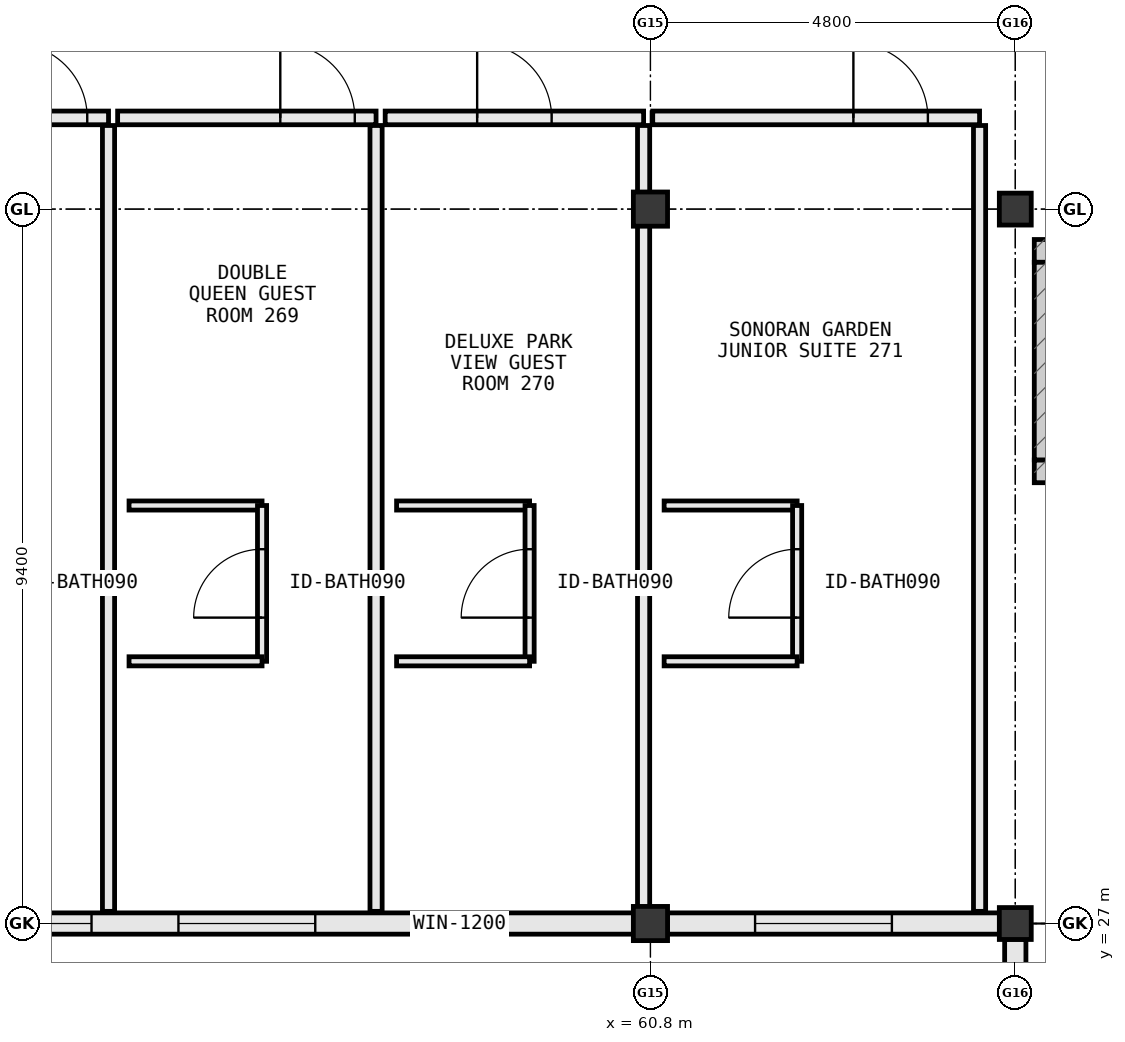
"""IFC4 building model, lengths in metres.
Left out: names, types, materials, properties, quantities, classifications, styles, units other than length and angle.
Written with IfcOpenShell. Run it as: python <this file> out.ifc"""

import sys

from ifc_helpers import new_model, si_unit, direction, frame, frame_2d, origin, origin_2d, place, context, subcontext, project, spatial, rectangle, extrude, element, fill, save


model = new_model("IFC4")
c1 = context("Model", 3, precision=1e-05, world=origin(), true_north=direction((0.0, 1.0)))
c2 = subcontext(c1, "Body", "Model", "MODEL_VIEW")
j1 = project(units=[si_unit("LENGTHUNIT", "METRE"), si_unit("PLANEANGLEUNIT", "RADIAN")], contexts=[c1])
p1 = place(None, origin())
s1 = spatial("IfcSite", under=j1, at=p1, CompositionType="ELEMENT")
p2 = place(p1, origin())
s2 = spatial("IfcBuilding", under=s1, at=p2, CompositionType="ELEMENT")
p3 = place(p2, frame((0.0, 0.0, 39.0)))
s3 = spatial("IfcBuildingStorey", under=s2, at=p3, CompositionType="ELEMENT", Elevation=39.0)
for number, where, z_axis, x_axis in (
    (1, (60.8, 27.0, 0.0), (0.0, 0.0, 1.0), (1.0, 0.0, 0.0)),
    (2, (60.8, 36.4, 0.0), (0.0, 0.0, 1.0), (1.0, 0.0, 0.0)),
):
    element("IfcColumn", number, at=place(p3, frame(where, z_axis=z_axis, x_axis=x_axis)), inside=s3, PredefinedType="COLUMN", context=c2, shape_type="SweptSolid", body=[
        extrude(rectangle(XDim=0.45, YDim=0.45, at=origin_2d()), origin(), (0.0, 0.0, 1.0), 3.8),
    ])
for number, where, z_axis, x_axis in (
    (3, (65.6, 27.0, 0.0), (0.0, 0.0, 1.0), (1.0, 0.0, 0.0)),
    (4, (65.6, 36.4, 0.0), (0.0, 0.0, 1.0), (1.0, 0.0, 0.0)),
):
    element("IfcColumn", number, at=place(p3, frame(where, z_axis=z_axis, x_axis=x_axis)), inside=s3, PredefinedType="COLUMN", context=c2, shape_type="SweptSolid", body=[
        extrude(rectangle(XDim=0.42, YDim=0.42, at=origin_2d()), origin(), (0.0, 0.0, 1.0), 3.8),
    ])
p4 = place(p3, frame((51.423, 27.0, 0.0), z_axis=(0.0, 0.0, 1.0), x_axis=(1.0, 0.0, 0.0)))
e5 = element("IfcWall", 5, at=p4, inside=s3, PredefinedType="STANDARD", context=c2, shape_type="SweptSolid", body=[
    extrude(rectangle(XDim=9.154, YDim=0.28, at=frame_2d((4.577, 0.0))), origin(), (0.0, 0.0, 1.0), 2.84),
])
p5 = place(p4, frame((6.265, 0.0, 0.85)))
e6 = element("IfcOpeningElement", 6, at=p5, cuts=e5, PredefinedType="OPENING", context=c2, shape_type="SweptSolid", body=[
    extrude(rectangle(XDim=1.2, YDim=1.55, at=frame_2d((0.6, 0.775))), frame((0.0, 0.152, 0.0), z_axis=(0.0, -1.0, 0.0), x_axis=(1.0, 0.0, 0.0)), (0.0, 0.0, 1.0), 0.304),
])
p6 = place(p4, frame((0.223, 0.0, 0.85)))
e7 = element("IfcOpeningElement", 7, at=p6, cuts=e5, PredefinedType="OPENING", context=c2, shape_type="SweptSolid", body=[
    extrude(rectangle(XDim=1.8, YDim=1.85, at=frame_2d((0.9, 0.925))), frame((0.0, 0.152, 0.0), z_axis=(0.0, -1.0, 0.0), x_axis=(1.0, 0.0, 0.0)), (0.0, 0.0, 1.0), 0.304),
])
p7 = place(p4, frame((3.167, 0.0, 0.85)))
e8 = element("IfcOpeningElement", 8, at=p7, cuts=e5, PredefinedType="OPENING", context=c2, shape_type="SweptSolid", body=[
    extrude(rectangle(XDim=1.8, YDim=1.85, at=frame_2d((0.9, 0.925))), frame((0.0, 0.152, 0.0), z_axis=(0.0, -1.0, 0.0), x_axis=(1.0, 0.0, 0.0)), (0.0, 0.0, 1.0), 0.304),
])
p8 = place(p3, frame((61.023, 27.0, 0.0), z_axis=(0.0, 0.0, 1.0), x_axis=(1.0, 0.0, 0.0)))
e9 = element("IfcWall", 9, at=p8, inside=s3, PredefinedType="STANDARD", context=c2, shape_type="SweptSolid", body=[
    extrude(rectangle(XDim=4.369, YDim=0.28, at=frame_2d((2.185, 0.0))), origin(), (0.0, 0.0, 1.0), 3.02),
])
p9 = place(p8, frame((1.154, 0.0, 0.85)))
e10 = element("IfcOpeningElement", 10, at=p9, cuts=e9, PredefinedType="OPENING", context=c2, shape_type="SweptSolid", body=[
    extrude(rectangle(XDim=1.8, YDim=1.85, at=frame_2d((0.9, 0.925))), frame((0.0, 0.152, 0.0), z_axis=(0.0, -1.0, 0.0), x_axis=(1.0, 0.0, 0.0)), (0.0, 0.0, 1.0), 0.304),
])
p10 = place(p3, frame((65.6, 26.792, 0.0), z_axis=(0.0, 0.0, 1.0), x_axis=(0.0, -1.0, 0.0)))
e11 = element("IfcWall", 11, at=p10, inside=s3, PredefinedType="STANDARD", context=c2, shape_type="SweptSolid", body=[
    extrude(rectangle(XDim=7.984, YDim=0.28, at=frame_2d((3.992, 0.0))), origin(), (0.0, 0.0, 1.0), 3.02),
])
p11 = place(p10, frame((3.242, 0.0, 0.85)))
e12 = element("IfcOpeningElement", 12, at=p11, cuts=e11, PredefinedType="OPENING", context=c2, shape_type="SweptSolid", body=[
    extrude(rectangle(XDim=1.5, YDim=1.75, at=frame_2d((0.75, 0.875))), frame((0.0, 0.152, 0.0), z_axis=(0.0, -1.0, 0.0), x_axis=(1.0, 0.0, 0.0)), (0.0, 0.0, 1.0), 0.304),
])
p12 = place(p3, frame((65.85, 32.95, 0.0), z_axis=(0.0, 0.0, 1.0), x_axis=(1.0, 0.0, 0.0)))
e13 = element("IfcWall", 13, at=p12, inside=s3, PredefinedType="SHEAR", context=c2, shape_type="SweptSolid", body=[
    extrude(rectangle(XDim=2.9, YDim=0.3, at=frame_2d((1.45, 0.0))), origin(), (0.0, 0.0, 1.0), 3.8),
])
p13 = place(p12, frame((0.85, 0.0, 0.0)))
e14 = element("IfcOpeningElement", 14, at=p13, cuts=e13, PredefinedType="OPENING", context=c2, shape_type="SweptSolid", body=[
    extrude(rectangle(XDim=1.2, YDim=2.2, at=frame_2d((0.6, 1.1))), frame((0.0, 0.162, 0.0), z_axis=(0.0, -1.0, 0.0), x_axis=(1.0, 0.0, 0.0)), (0.0, 0.0, 1.0), 0.324),
])
p14 = place(p3, frame((68.75, 35.85, 0.0), z_axis=(0.0, 0.0, 1.0), x_axis=(-1.0, 0.0, 0.0)))
e15 = element("IfcWall", 15, at=p14, inside=s3, PredefinedType="SHEAR", context=c2, shape_type="SweptSolid", body=[
    extrude(rectangle(XDim=2.9, YDim=0.3, at=frame_2d((1.45, 0.0))), origin(), (0.0, 0.0, 1.0), 3.8),
])
p15 = place(p3, frame((66.0, 35.7, 0.0), z_axis=(0.0, 0.0, 1.0), x_axis=(0.0, -1.0, 0.0)))
e16 = element("IfcWall", 16, at=p15, inside=s3, PredefinedType="SHEAR", context=c2, shape_type="SweptSolid", body=[
    extrude(rectangle(XDim=2.6, YDim=0.3, at=frame_2d((1.3, 0.0))), origin(), (0.0, 0.0, 1.0), 3.8),
])
p16 = place(p3, frame((53.67, 37.6, 0.0), z_axis=(0.0, 0.0, 1.0), x_axis=(-1.0, 0.0, 0.0)))
e17 = element("IfcWall", 17, at=p16, inside=s3, PredefinedType="PARTITIONING", context=c2, shape_type="SweptSolid", body=[
    extrude(rectangle(XDim=3.4, YDim=0.18, at=frame_2d((1.7, 0.0))), origin(), (0.0, 0.0, 1.0), 3.565),
])
p17 = place(p16, frame((0.28, 0.0, 0.0)))
e18 = element("IfcOpeningElement", 18, at=p17, cuts=e17, PredefinedType="OPENING", context=c2, shape_type="SweptSolid", body=[
    extrude(rectangle(XDim=0.98, YDim=2.18, at=frame_2d((0.49, 1.09))), frame((0.0, 0.102, 0.0), z_axis=(0.0, -1.0, 0.0), x_axis=(1.0, 0.0, 0.0)), (0.0, 0.0, 1.0), 0.204),
])
p18 = place(p3, frame((53.67, 27.16, 0.0), z_axis=(0.0, 0.0, 1.0), x_axis=(0.0, 1.0, 0.0)))
e19 = element("IfcWall", 19, at=p18, inside=s3, PredefinedType="PARTITIONING", context=c2, shape_type="SweptSolid", body=[
    extrude(rectangle(XDim=10.34, YDim=0.16, at=frame_2d((5.17, 0.0))), origin(), (0.0, 0.0, 1.0), 3.565),
])
p19 = place(p3, frame((57.19, 37.6, 0.0), z_axis=(0.0, 0.0, 1.0), x_axis=(-1.0, 0.0, 0.0)))
e20 = element("IfcWall", 20, at=p19, inside=s3, PredefinedType="PARTITIONING", context=c2, shape_type="SweptSolid", body=[
    extrude(rectangle(XDim=3.4, YDim=0.18, at=frame_2d((1.7, 0.0))), origin(), (0.0, 0.0, 1.0), 3.565),
])
p20 = place(p19, frame((0.28, 0.0, 0.0)))
e21 = element("IfcOpeningElement", 21, at=p20, cuts=e20, PredefinedType="OPENING", context=c2, shape_type="SweptSolid", body=[
    extrude(rectangle(XDim=0.98, YDim=2.18, at=frame_2d((0.49, 1.09))), frame((0.0, 0.102, 0.0), z_axis=(0.0, -1.0, 0.0), x_axis=(1.0, 0.0, 0.0)), (0.0, 0.0, 1.0), 0.204),
])
p21 = place(p3, frame((57.19, 27.16, 0.0), z_axis=(0.0, 0.0, 1.0), x_axis=(0.0, 1.0, 0.0)))
e22 = element("IfcWall", 22, at=p21, inside=s3, PredefinedType="PARTITIONING", context=c2, shape_type="SweptSolid", body=[
    extrude(rectangle(XDim=10.34, YDim=0.16, at=frame_2d((5.17, 0.0))), origin(), (0.0, 0.0, 1.0), 3.11),
])
p22 = place(p3, frame((53.94, 32.5, 0.0), z_axis=(0.0, 0.0, 1.0), x_axis=(1.0, 0.0, 0.0)))
e23 = element("IfcWall", 23, at=p22, inside=s3, PredefinedType="PARTITIONING", context=c2, shape_type="SweptSolid", body=[
    extrude(rectangle(XDim=1.75, YDim=0.12, at=frame_2d((0.875, 0.0))), origin(), (0.0, 0.0, 1.0), 3.565),
])
p23 = place(p3, frame((55.69, 30.45, 0.0), z_axis=(0.0, 0.0, 1.0), x_axis=(0.0, 1.0, 0.0)))
e24 = element("IfcWall", 24, at=p23, inside=s3, PredefinedType="PARTITIONING", context=c2, shape_type="SweptSolid", body=[
    extrude(rectangle(XDim=2.05, YDim=0.12, at=frame_2d((1.025, 0.0))), origin(), (0.0, 0.0, 1.0), 3.565),
])
p24 = place(p23, frame((0.575, 0.0, 0.0)))
e25 = element("IfcOpeningElement", 25, at=p24, cuts=e24, PredefinedType="OPENING", context=c2, shape_type="SweptSolid", body=[
    extrude(rectangle(XDim=0.9, YDim=2.15, at=frame_2d((0.45, 1.075))), frame((0.0, 0.072, 0.0), z_axis=(0.0, -1.0, 0.0), x_axis=(1.0, 0.0, 0.0)), (0.0, 0.0, 1.0), 0.144),
])
p25 = place(p3, frame((53.94, 30.45, 0.0), z_axis=(0.0, 0.0, 1.0), x_axis=(1.0, 0.0, 0.0)))
e26 = element("IfcWall", 26, at=p25, inside=s3, PredefinedType="PARTITIONING", context=c2, shape_type="SweptSolid", body=[
    extrude(rectangle(XDim=1.75, YDim=0.12, at=frame_2d((0.875, 0.0))), origin(), (0.0, 0.0, 1.0), 3.565),
])
p26 = place(p3, frame((60.71, 37.6, 0.0), z_axis=(0.0, 0.0, 1.0), x_axis=(-1.0, 0.0, 0.0)))
e27 = element("IfcWall", 27, at=p26, inside=s3, PredefinedType="PARTITIONING", context=c2, shape_type="SweptSolid", body=[
    extrude(rectangle(XDim=3.4, YDim=0.18, at=frame_2d((1.7, 0.0))), origin(), (0.0, 0.0, 1.0), 3.565),
])
p27 = place(p26, frame((1.21, 0.0, 0.0)))
e28 = element("IfcOpeningElement", 28, at=p27, cuts=e27, PredefinedType="OPENING", context=c2, shape_type="SweptSolid", body=[
    extrude(rectangle(XDim=0.98, YDim=2.18, at=frame_2d((0.49, 1.09))), frame((0.0, 0.102, 0.0), z_axis=(0.0, -1.0, 0.0), x_axis=(1.0, 0.0, 0.0)), (0.0, 0.0, 1.0), 0.204),
])
p28 = place(p3, frame((60.71, 27.16, 0.0), z_axis=(0.0, 0.0, 1.0), x_axis=(0.0, 1.0, 0.0)))
e29 = element("IfcWall", 29, at=p28, inside=s3, PredefinedType="PARTITIONING", context=c2, shape_type="SweptSolid", body=[
    extrude(rectangle(XDim=10.34, YDim=0.16, at=frame_2d((5.17, 0.0))), origin(), (0.0, 0.0, 1.0), 2.92),
])
p29 = place(p3, frame((57.46, 32.5, 0.0), z_axis=(0.0, 0.0, 1.0), x_axis=(1.0, 0.0, 0.0)))
e30 = element("IfcWall", 30, at=p29, inside=s3, PredefinedType="PARTITIONING", context=c2, shape_type="SweptSolid", body=[
    extrude(rectangle(XDim=1.75, YDim=0.12, at=frame_2d((0.875, 0.0))), origin(), (0.0, 0.0, 1.0), 3.565),
])
p30 = place(p3, frame((59.21, 30.45, 0.0), z_axis=(0.0, 0.0, 1.0), x_axis=(0.0, 1.0, 0.0)))
e31 = element("IfcWall", 31, at=p30, inside=s3, PredefinedType="PARTITIONING", context=c2, shape_type="SweptSolid", body=[
    extrude(rectangle(XDim=2.05, YDim=0.12, at=frame_2d((1.025, 0.0))), origin(), (0.0, 0.0, 1.0), 3.565),
])
p31 = place(p30, frame((0.575, 0.0, 0.0)))
e32 = element("IfcOpeningElement", 32, at=p31, cuts=e31, PredefinedType="OPENING", context=c2, shape_type="SweptSolid", body=[
    extrude(rectangle(XDim=0.9, YDim=2.15, at=frame_2d((0.45, 1.075))), frame((0.0, 0.072, 0.0), z_axis=(0.0, -1.0, 0.0), x_axis=(1.0, 0.0, 0.0)), (0.0, 0.0, 1.0), 0.144),
])
p32 = place(p3, frame((57.46, 30.45, 0.0), z_axis=(0.0, 0.0, 1.0), x_axis=(1.0, 0.0, 0.0)))
e33 = element("IfcWall", 33, at=p32, inside=s3, PredefinedType="PARTITIONING", context=c2, shape_type="SweptSolid", body=[
    extrude(rectangle(XDim=1.75, YDim=0.12, at=frame_2d((0.875, 0.0))), origin(), (0.0, 0.0, 1.0), 3.565),
])
p33 = place(p3, frame((65.13, 37.6, 0.0), z_axis=(0.0, 0.0, 1.0), x_axis=(-1.0, 0.0, 0.0)))
e34 = element("IfcWall", 34, at=p33, inside=s3, PredefinedType="PARTITIONING", context=c2, shape_type="SweptSolid", body=[
    extrude(rectangle(XDim=4.3, YDim=0.18, at=frame_2d((2.15, 0.0))), origin(), (0.0, 0.0, 1.0), 3.565),
])
p34 = place(p33, frame((0.68, 0.0, 0.0)))
e35 = element("IfcOpeningElement", 35, at=p34, cuts=e34, PredefinedType="OPENING", context=c2, shape_type="SweptSolid", body=[
    extrude(rectangle(XDim=0.98, YDim=2.18, at=frame_2d((0.49, 1.09))), frame((0.0, 0.102, 0.0), z_axis=(0.0, -1.0, 0.0), x_axis=(1.0, 0.0, 0.0)), (0.0, 0.0, 1.0), 0.204),
])
p35 = place(p3, frame((65.13, 27.16, 0.0), z_axis=(0.0, 0.0, 1.0), x_axis=(0.0, 1.0, 0.0)))
e36 = element("IfcWall", 36, at=p35, inside=s3, PredefinedType="PARTITIONING", context=c2, shape_type="SweptSolid", body=[
    extrude(rectangle(XDim=10.34, YDim=0.16, at=frame_2d((5.17, 0.0))), origin(), (0.0, 0.0, 1.0), 3.565),
])
p36 = place(p3, frame((60.98, 32.5, 0.0), z_axis=(0.0, 0.0, 1.0), x_axis=(1.0, 0.0, 0.0)))
e37 = element("IfcWall", 37, at=p36, inside=s3, PredefinedType="PARTITIONING", context=c2, shape_type="SweptSolid", body=[
    extrude(rectangle(XDim=1.75, YDim=0.12, at=frame_2d((0.875, 0.0))), origin(), (0.0, 0.0, 1.0), 3.565),
])
p37 = place(p3, frame((62.73, 30.45, 0.0), z_axis=(0.0, 0.0, 1.0), x_axis=(0.0, 1.0, 0.0)))
e38 = element("IfcWall", 38, at=p37, inside=s3, PredefinedType="PARTITIONING", context=c2, shape_type="SweptSolid", body=[
    extrude(rectangle(XDim=2.05, YDim=0.12, at=frame_2d((1.025, 0.0))), origin(), (0.0, 0.0, 1.0), 3.565),
])
p38 = place(p37, frame((0.575, 0.0, 0.0)))
e39 = element("IfcOpeningElement", 39, at=p38, cuts=e38, PredefinedType="OPENING", context=c2, shape_type="SweptSolid", body=[
    extrude(rectangle(XDim=0.9, YDim=2.15, at=frame_2d((0.45, 1.075))), frame((0.0, 0.072, 0.0), z_axis=(0.0, -1.0, 0.0), x_axis=(1.0, 0.0, 0.0)), (0.0, 0.0, 1.0), 0.144),
])
p39 = place(p3, frame((60.98, 30.45, 0.0), z_axis=(0.0, 0.0, 1.0), x_axis=(1.0, 0.0, 0.0)))
e40 = element("IfcWall", 40, at=p39, inside=s3, PredefinedType="PARTITIONING", context=c2, shape_type="SweptSolid", body=[
    extrude(rectangle(XDim=1.75, YDim=0.12, at=frame_2d((0.875, 0.0))), origin(), (0.0, 0.0, 1.0), 3.565),
])
p40 = place(p5, origin())
e41 = element("IfcWindow", 41, at=p40, inside=s3, PartitioningType="SINGLE_PANEL", PredefinedType="WINDOW", context=c2, shape_type="SweptSolid", body=[
    extrude(rectangle(XDim=1.2, YDim=1.55, at=frame_2d((0.6, 0.775))), frame((0.0, 0.03, 0.0), z_axis=(0.0, -1.0, 0.0), x_axis=(1.0, 0.0, 0.0)), (0.0, 0.0, 1.0), 0.06),
])
fill(e6, e41)
p41 = place(p6, origin())
e42 = element("IfcWindow", 42, at=p41, inside=s3, PartitioningType="SINGLE_PANEL", PredefinedType="WINDOW", context=c2, shape_type="SweptSolid", body=[
    extrude(rectangle(XDim=1.8, YDim=1.85, at=frame_2d((0.9, 0.925))), frame((0.0, 0.03, 0.0), z_axis=(0.0, -1.0, 0.0), x_axis=(1.0, 0.0, 0.0)), (0.0, 0.0, 1.0), 0.06),
])
fill(e7, e42)
p42 = place(p7, origin())
e43 = element("IfcWindow", 43, at=p42, inside=s3, PartitioningType="SINGLE_PANEL", PredefinedType="WINDOW", context=c2, shape_type="SweptSolid", body=[
    extrude(rectangle(XDim=1.8, YDim=1.85, at=frame_2d((0.9, 0.925))), frame((0.0, 0.03, 0.0), z_axis=(0.0, -1.0, 0.0), x_axis=(1.0, 0.0, 0.0)), (0.0, 0.0, 1.0), 0.06),
])
fill(e8, e43)
p43 = place(p9, origin())
e44 = element("IfcWindow", 44, at=p43, inside=s3, PartitioningType="SINGLE_PANEL", PredefinedType="WINDOW", context=c2, shape_type="SweptSolid", body=[
    extrude(rectangle(XDim=1.8, YDim=1.85, at=frame_2d((0.9, 0.925))), frame((0.0, 0.03, 0.0), z_axis=(0.0, -1.0, 0.0), x_axis=(1.0, 0.0, 0.0)), (0.0, 0.0, 1.0), 0.06),
])
fill(e10, e44)
p44 = place(p17, frame((0.98, 0.0, 0.0), z_axis=(0.0, 0.0, 1.0), x_axis=(-1.0, 0.0, 0.0)))
e45 = element("IfcDoor", 45, at=p44, inside=s3, OperationType="SINGLE_SWING_RIGHT", PredefinedType="DOOR", context=c2, shape_type="SweptSolid", body=[
    extrude(rectangle(XDim=0.98, YDim=2.18, at=frame_2d((0.49, 1.09))), frame((0.0, 0.025, 0.0), z_axis=(0.0, -1.0, 0.0), x_axis=(1.0, 0.0, 0.0)), (0.0, 0.0, 1.0), 0.05),
])
fill(e18, e45)
p45 = place(p20, frame((0.98, 0.0, 0.0), z_axis=(0.0, 0.0, 1.0), x_axis=(-1.0, 0.0, 0.0)))
e46 = element("IfcDoor", 46, at=p45, inside=s3, OperationType="SINGLE_SWING_RIGHT", PredefinedType="DOOR", context=c2, shape_type="SweptSolid", body=[
    extrude(rectangle(XDim=0.98, YDim=2.18, at=frame_2d((0.49, 1.09))), frame((0.0, 0.025, 0.0), z_axis=(0.0, -1.0, 0.0), x_axis=(1.0, 0.0, 0.0)), (0.0, 0.0, 1.0), 0.05),
])
fill(e21, e46)
p46 = place(p24, origin())
e47 = element("IfcDoor", 47, at=p46, inside=s3, OperationType="SINGLE_SWING_LEFT", PredefinedType="DOOR", context=c2, shape_type="SweptSolid", body=[
    extrude(rectangle(XDim=0.9, YDim=2.15, at=frame_2d((0.45, 1.075))), frame((0.0, 0.025, 0.0), z_axis=(0.0, -1.0, 0.0), x_axis=(1.0, 0.0, 0.0)), (0.0, 0.0, 1.0), 0.05),
])
fill(e25, e47)
p47 = place(p27, frame((0.98, 0.0, 0.0), z_axis=(0.0, 0.0, 1.0), x_axis=(-1.0, 0.0, 0.0)))
e48 = element("IfcDoor", 48, at=p47, inside=s3, OperationType="SINGLE_SWING_RIGHT", PredefinedType="DOOR", context=c2, shape_type="SweptSolid", body=[
    extrude(rectangle(XDim=0.98, YDim=2.18, at=frame_2d((0.49, 1.09))), frame((0.0, 0.025, 0.0), z_axis=(0.0, -1.0, 0.0), x_axis=(1.0, 0.0, 0.0)), (0.0, 0.0, 1.0), 0.05),
])
fill(e28, e48)
p48 = place(p31, origin())
e49 = element("IfcDoor", 49, at=p48, inside=s3, OperationType="SINGLE_SWING_LEFT", PredefinedType="DOOR", context=c2, shape_type="SweptSolid", body=[
    extrude(rectangle(XDim=0.9, YDim=2.15, at=frame_2d((0.45, 1.075))), frame((0.0, 0.025, 0.0), z_axis=(0.0, -1.0, 0.0), x_axis=(1.0, 0.0, 0.0)), (0.0, 0.0, 1.0), 0.05),
])
fill(e32, e49)
p49 = place(p34, frame((0.98, 0.0, 0.0), z_axis=(0.0, 0.0, 1.0), x_axis=(-1.0, 0.0, 0.0)))
e50 = element("IfcDoor", 50, at=p49, inside=s3, OperationType="SINGLE_SWING_RIGHT", PredefinedType="DOOR", context=c2, shape_type="SweptSolid", body=[
    extrude(rectangle(XDim=0.98, YDim=2.18, at=frame_2d((0.49, 1.09))), frame((0.0, 0.025, 0.0), z_axis=(0.0, -1.0, 0.0), x_axis=(1.0, 0.0, 0.0)), (0.0, 0.0, 1.0), 0.05),
])
fill(e35, e50)
p50 = place(p38, origin())
e51 = element("IfcDoor", 51, at=p50, inside=s3, OperationType="SINGLE_SWING_LEFT", PredefinedType="DOOR", context=c2, shape_type="SweptSolid", body=[
    extrude(rectangle(XDim=0.9, YDim=2.15, at=frame_2d((0.45, 1.075))), frame((0.0, 0.025, 0.0), z_axis=(0.0, -1.0, 0.0), x_axis=(1.0, 0.0, 0.0)), (0.0, 0.0, 1.0), 0.05),
])
fill(e39, e51)
save(model, sys.argv[1])
